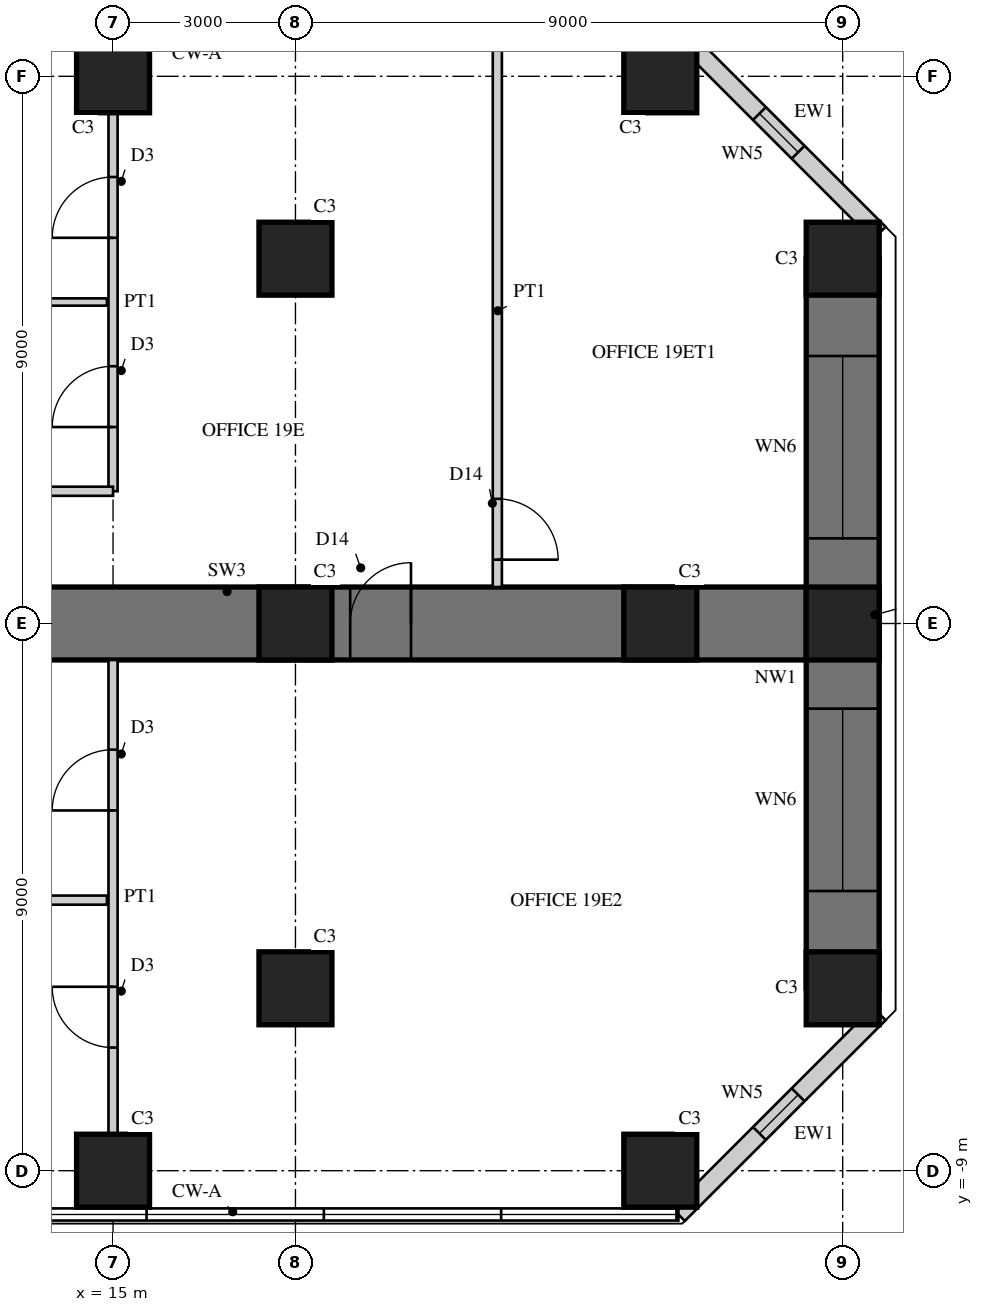
"""IFC4 building model, lengths in metres.
Left out: names, types, materials, properties, quantities, classifications, styles, units other than length and angle.
Written with IfcOpenShell. Run it as: python <this file> out.ifc"""

import sys

from ifc_helpers import new_model, si_unit, direction, frame, frame_2d, origin, origin_2d, place, context, subcontext, project, spatial, rectangle, hollow_rectangle, extrude, element, fill, save


model = new_model("IFC4")
c1 = context("Model", 3, precision=1e-05, world=origin(), true_north=direction((0.0, 1.0)))
c2 = subcontext(c1, "Body", "Model", "MODEL_VIEW")
j1 = project(units=[si_unit("LENGTHUNIT", "METRE"), si_unit("PLANEANGLEUNIT", "RADIAN")], contexts=[c1])
p1 = place(None, origin())
s1 = spatial("IfcSite", under=j1, at=p1, CompositionType="ELEMENT")
p2 = place(p1, origin())
s2 = spatial("IfcBuilding", under=s1, at=p2, CompositionType="ELEMENT")
p3 = place(p2, frame((0.0, 0.0, 79.5)))
s3 = spatial("IfcBuildingStorey", under=s2, at=p3, CompositionType="ELEMENT", Elevation=79.5)
p4 = place(p3, frame((9.0, 0.0, 0.0), z_axis=(0.0, 0.0, 1.0), x_axis=(1.0, 0.0, 0.0)))
e1 = element("IfcWall", 1, at=p4, inside=s3, PredefinedType="SHEAR", context=c2, shape_type="SweptSolid", body=[
    extrude(rectangle(XDim=18.0, YDim=1.2, at=frame_2d((9.0, 0.0))), origin(), (0.0, 0.0, 1.0), 4.0),
])
p5 = place(p4, frame((9.9, 0.0, 0.0)))
e2 = element("IfcOpeningElement", 2, at=p5, cuts=e1, PredefinedType="OPENING", context=c2, shape_type="SweptSolid", body=[
    extrude(rectangle(XDim=1.0, YDim=2.2, at=frame_2d((0.5, 1.1))), frame((0.0, 0.61, 0.0), z_axis=(0.0, -1.0, 0.0), x_axis=(1.0, 0.0, 0.0)), (0.0, 0.0, 1.0), 1.22),
])
p6 = place(p3, frame((27.0, -6.0, 0.0), z_axis=(0.0, 0.0, 1.0), x_axis=(0.0, 1.0, 0.0)))
e3 = element("IfcWall", 3, at=p6, inside=s3, PredefinedType="SHEAR", context=c2, shape_type="SweptSolid", body=[
    extrude(rectangle(XDim=12.0, YDim=1.2, at=frame_2d((6.0, 0.0))), origin(), (0.0, 0.0, 1.0), 4.0),
])
p7 = place(p6, frame((1.6, 0.0, 0.6)))
e4 = element("IfcOpeningElement", 4, at=p7, cuts=e3, PredefinedType="OPENING", context=c2, shape_type="SweptSolid", body=[
    extrude(rectangle(XDim=3.0, YDim=2.4, at=frame_2d((1.5, 1.2))), frame((0.0, 0.61, 0.0), z_axis=(0.0, -1.0, 0.0), x_axis=(1.0, 0.0, 0.0)), (0.0, 0.0, 1.0), 1.22),
])
p8 = place(p6, frame((7.4, 0.0, 0.6)))
e5 = element("IfcOpeningElement", 5, at=p8, cuts=e3, PredefinedType="OPENING", context=c2, shape_type="SweptSolid", body=[
    extrude(rectangle(XDim=3.0, YDim=2.4, at=frame_2d((1.5, 1.2))), frame((0.0, 0.61, 0.0), z_axis=(0.0, -1.0, 0.0), x_axis=(1.0, 0.0, 0.0)), (0.0, 0.0, 1.0), 1.22),
])
for number, where, z_axis, x_axis in (
    (6, (15.0, -9.0, 0.0), (0.0, 0.0, 1.0), (1.0, 0.0, 0.0)),
    (7, (24.0, -9.0, 0.0), (0.0, 0.0, 1.0), (1.0, 0.0, 0.0)),
    (8, (15.0, 9.0, 0.0), (0.0, 0.0, 1.0), (1.0, 0.0, 0.0)),
    (9, (24.0, 9.0, 0.0), (0.0, 0.0, 1.0), (1.0, 0.0, 0.0)),
    (10, (27.0, -6.0, 0.0), (0.0, 0.0, 1.0), (1.0, 0.0, 0.0)),
    (11, (27.0, 0.0, 0.0), (0.0, 0.0, 1.0), (1.0, 0.0, 0.0)),
    (12, (27.0, 6.0, 0.0), (0.0, 0.0, 1.0), (1.0, 0.0, 0.0)),
    (13, (18.0, -6.0, 0.0), (0.0, 0.0, 1.0), (1.0, 0.0, 0.0)),
    (14, (18.0, 0.0, 0.0), (0.0, 0.0, 1.0), (1.0, 0.0, 0.0)),
    (15, (18.0, 6.0, 0.0), (0.0, 0.0, 1.0), (1.0, 0.0, 0.0)),
    (16, (24.0, 0.0, 0.0), (0.0, 0.0, 1.0), (1.0, 0.0, 0.0)),
):
    element("IfcColumn", number, at=place(p3, frame(where, z_axis=z_axis, x_axis=x_axis)), inside=s3, PredefinedType="COLUMN", context=c2, shape_type="SweptSolid", body=[
        extrude(rectangle(XDim=1.2, YDim=1.2, at=origin_2d()), origin(), (0.0, 0.0, 1.0), 4.0),
    ])
p9 = place(p3, frame((24.298, -9.72, 0.0), z_axis=(0.0, 0.0, 1.0), x_axis=(0.707106781187, 0.707106781187, 0.0)))
e17 = element("IfcWall", 17, at=p9, inside=s3, PredefinedType="SOLIDWALL", context=c2, shape_type="SweptSolid", body=[
    extrude(rectangle(XDim=4.669, YDim=0.3, at=frame_2d((2.335, 0.0))), origin(), (0.0, 0.0, 1.0), 3.8),
])
p10 = place(p9, frame((1.885, 0.0, 0.3)))
e18 = element("IfcOpeningElement", 18, at=p10, cuts=e17, PredefinedType="OPENING", context=c2, shape_type="SweptSolid", body=[
    extrude(rectangle(XDim=0.9, YDim=2.4, at=frame_2d((0.45, 1.2))), frame((0.0, 0.16, 0.0), z_axis=(0.0, -1.0, 0.0), x_axis=(1.0, 0.0, 0.0)), (0.0, 0.0, 1.0), 0.32),
])
p11 = place(p3, frame((27.6, 6.418, 0.0), z_axis=(0.0, 0.0, 1.0), x_axis=(-0.707106781187, 0.707106781187, 0.0)))
e19 = element("IfcWall", 19, at=p11, inside=s3, PredefinedType="SOLIDWALL", context=c2, shape_type="SweptSolid", body=[
    extrude(rectangle(XDim=4.669, YDim=0.3, at=frame_2d((2.335, 0.0))), origin(), (0.0, 0.0, 1.0), 3.8),
])
p12 = place(p11, frame((1.885, 0.0, 0.3)))
e20 = element("IfcOpeningElement", 20, at=p12, cuts=e19, PredefinedType="OPENING", context=c2, shape_type="SweptSolid", body=[
    extrude(rectangle(XDim=0.9, YDim=2.4, at=frame_2d((0.45, 1.2))), frame((0.0, 0.16, 0.0), z_axis=(0.0, -1.0, 0.0), x_axis=(1.0, 0.0, 0.0)), (0.0, 0.0, 1.0), 0.32),
])
p13 = place(p3, frame((15.0, 2.175, 0.0), z_axis=(0.0, 0.0, 1.0), x_axis=(0.0, 1.0, 0.0)))
e21 = element("IfcWall", 21, at=p13, inside=s3, PredefinedType="PARTITIONING", context=c2, shape_type="SweptSolid", body=[
    extrude(rectangle(XDim=6.225, YDim=0.15, at=frame_2d((3.112, 0.0))), origin(), (0.0, 0.0, 1.0), 2.95),
])
p14 = place(p13, frame((1.056, 0.0, 0.0)))
e22 = element("IfcOpeningElement", 22, at=p14, cuts=e21, PredefinedType="OPENING", context=c2, shape_type="SweptSolid", body=[
    extrude(rectangle(XDim=1.0, YDim=2.1, at=frame_2d((0.5, 1.05))), frame((0.0, 0.085, 0.0), z_axis=(0.0, -1.0, 0.0), x_axis=(1.0, 0.0, 0.0)), (0.0, 0.0, 1.0), 0.17),
])
p15 = place(p13, frame((4.169, 0.0, 0.0)))
e23 = element("IfcOpeningElement", 23, at=p15, cuts=e21, PredefinedType="OPENING", context=c2, shape_type="SweptSolid", body=[
    extrude(rectangle(XDim=1.0, YDim=2.1, at=frame_2d((0.5, 1.05))), frame((0.0, 0.085, 0.0), z_axis=(0.0, -1.0, 0.0), x_axis=(1.0, 0.0, 0.0)), (0.0, 0.0, 1.0), 0.17),
])
p16 = place(p3, frame((9.65, 2.175, 0.0), z_axis=(0.0, 0.0, 1.0), x_axis=(1.0, 0.0, 0.0)))
e24 = element("IfcWall", 24, at=p16, inside=s3, PredefinedType="PARTITIONING", context=c2, shape_type="SweptSolid", body=[
    extrude(rectangle(XDim=5.35, YDim=0.15, at=frame_2d((2.675, 0.0))), origin(), (0.0, 0.0, 1.0), 3.8),
])
p17 = place(p3, frame((9.65, 5.288, 0.0), z_axis=(0.0, 0.0, 1.0), x_axis=(1.0, 0.0, 0.0)))
e25 = element("IfcWall", 25, at=p17, inside=s3, PredefinedType="PLUMBINGWALL", context=c2, shape_type="SweptSolid", body=[
    extrude(rectangle(XDim=5.25, YDim=0.12, at=frame_2d((2.625, 0.0))), origin(), (0.0, 0.0, 1.0), 3.8),
])
p18 = place(p3, frame((15.0, -8.4, 0.0), z_axis=(0.0, 0.0, 1.0), x_axis=(0.0, 1.0, 0.0)))
e26 = element("IfcWall", 26, at=p18, inside=s3, PredefinedType="PARTITIONING", context=c2, shape_type="SweptSolid", body=[
    extrude(rectangle(XDim=7.8, YDim=0.15, at=frame_2d((3.9, 0.0))), origin(), (0.0, 0.0, 1.0), 2.95),
])
p19 = place(p18, frame((1.425, 0.0, 0.0)))
e27 = element("IfcOpeningElement", 27, at=p19, cuts=e26, PredefinedType="OPENING", context=c2, shape_type="SweptSolid", body=[
    extrude(rectangle(XDim=1.0, YDim=2.1, at=frame_2d((0.5, 1.05))), frame((0.0, 0.085, 0.0), z_axis=(0.0, -1.0, 0.0), x_axis=(1.0, 0.0, 0.0)), (0.0, 0.0, 1.0), 0.17),
])
p20 = place(p18, frame((5.325, 0.0, 0.0)))
e28 = element("IfcOpeningElement", 28, at=p20, cuts=e26, PredefinedType="OPENING", context=c2, shape_type="SweptSolid", body=[
    extrude(rectangle(XDim=1.0, YDim=2.1, at=frame_2d((0.5, 1.05))), frame((0.0, 0.085, 0.0), z_axis=(0.0, -1.0, 0.0), x_axis=(1.0, 0.0, 0.0)), (0.0, 0.0, 1.0), 0.17),
])
p21 = place(p3, frame((9.65, -4.55, 0.0), z_axis=(0.0, 0.0, 1.0), x_axis=(1.0, 0.0, 0.0)))
e29 = element("IfcWall", 29, at=p21, inside=s3, PredefinedType="PARTITIONING", context=c2, shape_type="SweptSolid", body=[
    extrude(rectangle(XDim=5.25, YDim=0.15, at=frame_2d((2.625, 0.0))), origin(), (0.0, 0.0, 1.0), 3.8),
])
p22 = place(p3, frame((21.32, 0.6, 0.0), z_axis=(0.0, 0.0, 1.0), x_axis=(0.0, 1.0, 0.0)))
e30 = element("IfcWall", 30, at=p22, inside=s3, PredefinedType="PARTITIONING", context=c2, shape_type="SweptSolid", body=[
    extrude(rectangle(XDim=9.08, YDim=0.15, at=frame_2d((4.54, 0.0))), origin(), (0.0, 0.0, 1.0), 3.8),
])
p23 = place(p22, frame((0.45, 0.0, 0.0)))
e31 = element("IfcOpeningElement", 31, at=p23, cuts=e30, PredefinedType="OPENING", context=c2, shape_type="SweptSolid", body=[
    extrude(rectangle(XDim=1.0, YDim=2.2, at=frame_2d((0.5, 1.1))), frame((0.0, 0.085, 0.0), z_axis=(0.0, -1.0, 0.0), x_axis=(1.0, 0.0, 0.0)), (0.0, 0.0, 1.0), 0.17),
])
p24 = place(p10, origin())
e32 = element("IfcWindow", 32, at=p24, inside=s3, PartitioningType="SINGLE_PANEL", PredefinedType="WINDOW", context=c2, shape_type="SweptSolid", body=[
    extrude(hollow_rectangle(XDim=0.9, YDim=2.4, WallThickness=0.06, at=frame_2d((0.45, 1.2))), frame((0.0, 0.03, 0.0), z_axis=(0.0, -1.0, 0.0), x_axis=(1.0, 0.0, 0.0)), (0.0, 0.0, 1.0), 0.06),
    extrude(rectangle(XDim=0.779, YDim=2.279, at=frame_2d((0.45, 1.2))), frame((0.0, 0.03, 0.0), z_axis=(0.0, -1.0, 0.0), x_axis=(1.0, 0.0, 0.0)), (0.0, 0.0, 1.0), 0.06),
])
fill(e18, e32)
p25 = place(p7, origin())
e33 = element("IfcWindow", 33, at=p25, inside=s3, PartitioningType="SINGLE_PANEL", PredefinedType="WINDOW", context=c2, shape_type="SweptSolid", body=[
    extrude(hollow_rectangle(XDim=3.0, YDim=2.4, WallThickness=0.06, at=frame_2d((1.5, 1.2))), frame((0.0, 0.03, 0.0), z_axis=(0.0, -1.0, 0.0), x_axis=(1.0, 0.0, 0.0)), (0.0, 0.0, 1.0), 0.06),
    extrude(rectangle(XDim=2.879, YDim=2.279, at=frame_2d((1.5, 1.2))), frame((0.0, 0.03, 0.0), z_axis=(0.0, -1.0, 0.0), x_axis=(1.0, 0.0, 0.0)), (0.0, 0.0, 1.0), 0.06),
])
fill(e4, e33)
p26 = place(p8, origin())
e34 = element("IfcWindow", 34, at=p26, inside=s3, PartitioningType="SINGLE_PANEL", PredefinedType="WINDOW", context=c2, shape_type="SweptSolid", body=[
    extrude(hollow_rectangle(XDim=3.0, YDim=2.4, WallThickness=0.06, at=frame_2d((1.5, 1.2))), frame((0.0, 0.03, 0.0), z_axis=(0.0, -1.0, 0.0), x_axis=(1.0, 0.0, 0.0)), (0.0, 0.0, 1.0), 0.06),
    extrude(rectangle(XDim=2.879, YDim=2.279, at=frame_2d((1.5, 1.2))), frame((0.0, 0.03, 0.0), z_axis=(0.0, -1.0, 0.0), x_axis=(1.0, 0.0, 0.0)), (0.0, 0.0, 1.0), 0.06),
])
fill(e5, e34)
p27 = place(p12, origin())
e35 = element("IfcWindow", 35, at=p27, inside=s3, PartitioningType="SINGLE_PANEL", PredefinedType="WINDOW", context=c2, shape_type="SweptSolid", body=[
    extrude(hollow_rectangle(XDim=0.9, YDim=2.4, WallThickness=0.06, at=frame_2d((0.45, 1.2))), frame((0.0, 0.03, 0.0), z_axis=(0.0, -1.0, 0.0), x_axis=(1.0, 0.0, 0.0)), (0.0, 0.0, 1.0), 0.06),
    extrude(rectangle(XDim=0.779, YDim=2.279, at=frame_2d((0.45, 1.2))), frame((0.0, 0.03, 0.0), z_axis=(0.0, -1.0, 0.0), x_axis=(1.0, 0.0, 0.0)), (0.0, 0.0, 1.0), 0.06),
])
fill(e20, e35)
p28 = place(p14, origin())
e36 = element("IfcDoor", 36, at=p28, inside=s3, OperationType="SINGLE_SWING_LEFT", PredefinedType="DOOR", context=c2, shape_type="SweptSolid", body=[
    extrude(rectangle(XDim=1.0, YDim=2.1, at=frame_2d((0.5, 1.05))), frame((0.0, 0.025, 0.0), z_axis=(0.0, -1.0, 0.0), x_axis=(1.0, 0.0, 0.0)), (0.0, 0.0, 1.0), 0.05),
])
fill(e22, e36)
p29 = place(p15, origin())
e37 = element("IfcDoor", 37, at=p29, inside=s3, OperationType="SINGLE_SWING_LEFT", PredefinedType="DOOR", context=c2, shape_type="SweptSolid", body=[
    extrude(rectangle(XDim=1.0, YDim=2.1, at=frame_2d((0.5, 1.05))), frame((0.0, 0.025, 0.0), z_axis=(0.0, -1.0, 0.0), x_axis=(1.0, 0.0, 0.0)), (0.0, 0.0, 1.0), 0.05),
])
fill(e23, e37)
p30 = place(p19, origin())
e38 = element("IfcDoor", 38, at=p30, inside=s3, OperationType="SINGLE_SWING_RIGHT", PredefinedType="DOOR", context=c2, shape_type="SweptSolid", body=[
    extrude(rectangle(XDim=1.0, YDim=2.1, at=frame_2d((0.5, 1.05))), frame((0.0, 0.025, 0.0), z_axis=(0.0, -1.0, 0.0), x_axis=(1.0, 0.0, 0.0)), (0.0, 0.0, 1.0), 0.05),
])
fill(e27, e38)
p31 = place(p20, origin())
e39 = element("IfcDoor", 39, at=p31, inside=s3, OperationType="SINGLE_SWING_LEFT", PredefinedType="DOOR", context=c2, shape_type="SweptSolid", body=[
    extrude(rectangle(XDim=1.0, YDim=2.1, at=frame_2d((0.5, 1.05))), frame((0.0, 0.025, 0.0), z_axis=(0.0, -1.0, 0.0), x_axis=(1.0, 0.0, 0.0)), (0.0, 0.0, 1.0), 0.05),
])
fill(e28, e39)
p32 = place(p23, frame((1.0, 0.0, 0.0), z_axis=(0.0, 0.0, 1.0), x_axis=(-1.0, 0.0, 0.0)))
e40 = element("IfcDoor", 40, at=p32, inside=s3, OperationType="SINGLE_SWING_RIGHT", PredefinedType="DOOR", context=c2, shape_type="SweptSolid", body=[
    extrude(rectangle(XDim=1.0, YDim=2.2, at=frame_2d((0.5, 1.1))), frame((0.0, 0.025, 0.0), z_axis=(0.0, -1.0, 0.0), x_axis=(1.0, 0.0, 0.0)), (0.0, 0.0, 1.0), 0.05),
])
fill(e31, e40)
p33 = place(p5, origin())
e41 = element("IfcDoor", 41, at=p33, inside=s3, OperationType="SINGLE_SWING_RIGHT", PredefinedType="DOOR", context=c2, shape_type="SweptSolid", body=[
    extrude(rectangle(XDim=1.0, YDim=2.2, at=frame_2d((0.5, 1.1))), frame((0.0, 0.025, 0.0), z_axis=(0.0, -1.0, 0.0), x_axis=(1.0, 0.0, 0.0)), (0.0, 0.0, 1.0), 0.05),
])
fill(e2, e41)
save(model, sys.argv[1])
